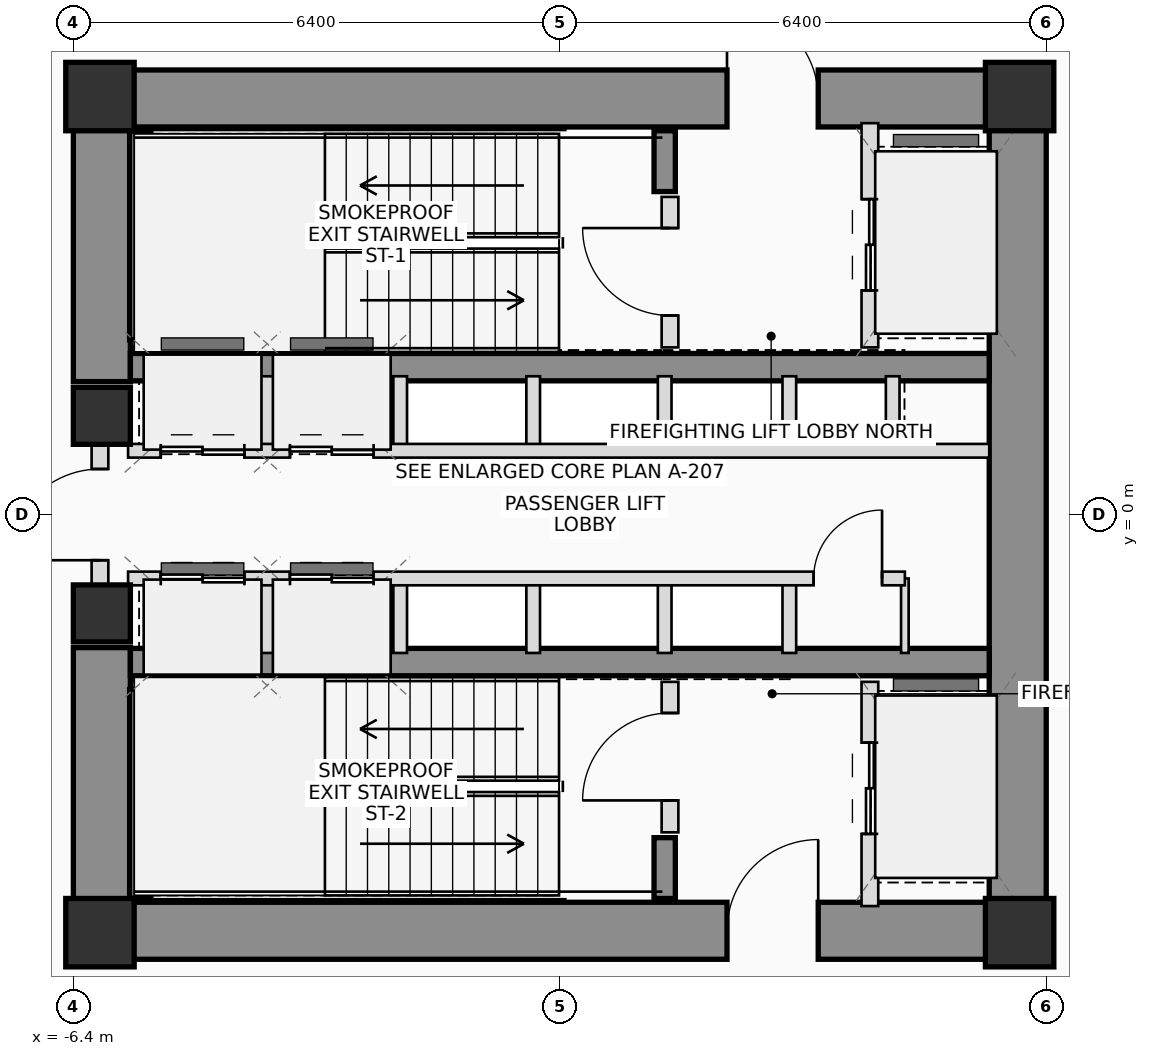
"""IFC4 building model, lengths in metres.
Left out: names, types, materials, properties, quantities, classifications, styles, units other than length and angle.
Written with IfcOpenShell. Run it as: python <this file> out.ifc"""

import sys

from ifc_helpers import new_model, si_unit, direction, frame, frame_2d, origin, origin_2d, place, context, subcontext, project, spatial, rectangle, extrude, source, transform, mapped, element, fill, save


model = new_model("IFC4")
c1 = context("Model", 3, precision=1e-05, world=origin(), true_north=direction((0.0, 1.0)))
c2 = subcontext(c1, "Body", "Model", "MODEL_VIEW")
j1 = project(units=[si_unit("LENGTHUNIT", "METRE"), si_unit("PLANEANGLEUNIT", "RADIAN")], contexts=[c1])
p1 = place(None, origin())
s1 = spatial("IfcSite", under=j1, at=p1, CompositionType="ELEMENT")
p2 = place(p1, origin())
s2 = spatial("IfcBuilding", under=s1, at=p2, CompositionType="ELEMENT")
p3 = place(p2, frame((0.0, 0.0, 69.8)))
s3 = spatial("IfcBuildingStorey", under=s2, at=p3, CompositionType="ELEMENT", Elevation=69.8)
m1 = source(origin(), c2, "Body", "SweptSolid", [
    extrude(rectangle(XDim=0.9, YDim=0.9, at=origin_2d()), origin(), (0.0, 0.0, 1.0), 3.75),
])
for number, where, z_axis, x_axis in (
    (1, (-6.05, -5.5, 0.0), (0.0, 0.0, 1.0), (1.0, 0.0, 0.0)),
    (2, (6.05, -5.5, 0.0), (0.0, 0.0, 1.0), (1.0, 0.0, 0.0)),
    (3, (6.05, 5.5, 0.0), (0.0, 0.0, 1.0), (1.0, 0.0, 0.0)),
    (4, (-6.05, 5.5, 0.0), (0.0, 0.0, 1.0), (1.0, 0.0, 0.0)),
):
    element("IfcColumn", number, at=place(p3, frame(where, z_axis=z_axis, x_axis=x_axis)), inside=s3, PredefinedType="COLUMN", context=c2, shape_type="MappedRepresentation", body=[
        mapped(m1, transform((0.0, 0.0, 0.0), scale=1.0)),
    ])
p4 = place(p3, frame((-6.4, 5.475, 0.0), z_axis=(0.0, 0.0, 1.0), x_axis=(1.0, 0.0, 0.0)))
e5 = element("IfcWall", 5, at=p4, inside=s3, PredefinedType="SHEAR", context=c2, shape_type="SweptSolid", body=[
    extrude(rectangle(XDim=12.8, YDim=0.75, at=frame_2d((6.4, 0.0))), origin(), (0.0, 0.0, 1.0), 3.75),
])
p5 = place(p4, frame((8.6, 0.0, 0.0)))
e6 = element("IfcOpeningElement", 6, at=p5, cuts=e5, PredefinedType="OPENING", context=c2, shape_type="SweptSolid", body=[
    extrude(rectangle(XDim=1.2, YDim=2.2, at=frame_2d((0.6, 1.1))), frame((0.0, 0.385, 0.0), z_axis=(0.0, -1.0, 0.0), x_axis=(1.0, 0.0, 0.0)), (0.0, 0.0, 1.0), 0.77),
])
p6 = place(p3, frame((-6.4, -5.475, 0.0), z_axis=(0.0, 0.0, 1.0), x_axis=(1.0, 0.0, 0.0)))
e7 = element("IfcWall", 7, at=p6, inside=s3, PredefinedType="SHEAR", context=c2, shape_type="SweptSolid", body=[
    extrude(rectangle(XDim=12.8, YDim=0.75, at=frame_2d((6.4, 0.0))), origin(), (0.0, 0.0, 1.0), 3.75),
])
p7 = place(p6, frame((8.6, 0.0, 0.0)))
e8 = element("IfcOpeningElement", 8, at=p7, cuts=e7, PredefinedType="OPENING", context=c2, shape_type="SweptSolid", body=[
    extrude(rectangle(XDim=1.2, YDim=2.2, at=frame_2d((0.6, 1.1))), frame((0.0, 0.385, 0.0), z_axis=(0.0, -1.0, 0.0), x_axis=(1.0, 0.0, 0.0)), (0.0, 0.0, 1.0), 0.77),
])
p8 = place(p3, frame((6.025, -5.1, 0.0), z_axis=(0.0, 0.0, 1.0), x_axis=(0.0, 1.0, 0.0)))
e9 = element("IfcWall", 9, at=p8, inside=s3, PredefinedType="SHEAR", context=c2, shape_type="SweptSolid", body=[
    extrude(rectangle(XDim=10.2, YDim=0.75, at=frame_2d((5.1, 0.0))), origin(), (0.0, 0.0, 1.0), 3.75),
])
for number, where, z_axis, x_axis in (
    (10, (-6.025, -5.1, 0.0), (0.0, 0.0, 1.0), (0.0, 1.0, 0.0)),
    (11, (-6.025, 1.75, 0.0), (0.0, 0.0, 1.0), (0.0, 1.0, 0.0)),
):
    element("IfcWall", number, at=place(p3, frame(where, z_axis=z_axis, x_axis=x_axis)), inside=s3, PredefinedType="SHEAR", context=c2, shape_type="SweptSolid", body=[
        extrude(rectangle(XDim=3.35, YDim=0.75, at=frame_2d((1.675, 0.0))), origin(), (0.0, 0.0, 1.0), 3.75),
    ])
for number, where, z_axis, x_axis in (
    (12, (-5.65, 1.94, 0.0), (0.0, 0.0, 1.0), (1.0, 0.0, 0.0)),
    (13, (-5.65, -1.94, 0.0), (0.0, 0.0, 1.0), (1.0, 0.0, 0.0)),
):
    element("IfcWall", number, at=place(p3, frame(where, z_axis=z_axis, x_axis=x_axis)), inside=s3, PredefinedType="SHEAR", context=c2, shape_type="SweptSolid", body=[
        extrude(rectangle(XDim=11.3, YDim=0.36, at=frame_2d((5.65, 0.0))), origin(), (0.0, 0.0, 1.0), 3.75),
    ])
p9 = place(p3, frame((-5.52, 2.3, 0.0), z_axis=(0.0, 0.0, 1.0), x_axis=(0.0, 1.0, 0.0)))
e14 = element("IfcWall", 14, at=p9, inside=s3, PredefinedType="SHEAR", context=c2, shape_type="SweptSolid", body=[
    extrude(rectangle(XDim=2.75, YDim=0.28, at=frame_2d((1.375, 0.0))), origin(), (0.0, 0.0, 1.0), 3.75),
])
p10 = place(p3, frame((1.38, 4.25, 0.0), z_axis=(0.0, 0.0, 1.0), x_axis=(0.0, 1.0, 0.0)))
e15 = element("IfcWall", 15, at=p10, inside=s3, PredefinedType="SHEAR", context=c2, shape_type="SweptSolid", body=[
    extrude(rectangle(XDim=0.8, YDim=0.28, at=frame_2d((0.4, 0.0))), origin(), (0.0, 0.0, 1.0), 3.75),
])
p11 = place(p3, frame((-5.52, -5.05, 0.0), z_axis=(0.0, 0.0, 1.0), x_axis=(0.0, 1.0, 0.0)))
e16 = element("IfcWall", 16, at=p11, inside=s3, PredefinedType="SHEAR", context=c2, shape_type="SweptSolid", body=[
    extrude(rectangle(XDim=2.75, YDim=0.28, at=frame_2d((1.375, 0.0))), origin(), (0.0, 0.0, 1.0), 3.75),
])
p12 = place(p3, frame((1.38, -5.05, 0.0), z_axis=(0.0, 0.0, 1.0), x_axis=(0.0, 1.0, 0.0)))
e17 = element("IfcWall", 17, at=p12, inside=s3, PredefinedType="SHEAR", context=c2, shape_type="SweptSolid", body=[
    extrude(rectangle(XDim=0.8, YDim=0.28, at=frame_2d((0.4, 0.0))), origin(), (0.0, 0.0, 1.0), 3.75),
])
m2 = source(origin(), c2, "Body", "SweptSolid", [
    extrude(rectangle(XDim=0.75, YDim=0.75, at=origin_2d()), origin(), (0.0, 0.0, 1.0), 3.75),
])
for number, where, z_axis, x_axis in (
    (18, (-6.025, -1.3, 0.0), (0.0, 0.0, 1.0), (1.0, 0.0, 0.0)),
    (19, (-6.025, 1.3, 0.0), (0.0, 0.0, 1.0), (1.0, 0.0, 0.0)),
):
    element("IfcColumn", number, at=place(p3, frame(where, z_axis=z_axis, x_axis=x_axis)), inside=s3, PredefinedType="COLUMN", context=c2, shape_type="MappedRepresentation", body=[
        mapped(m2, transform((0.0, 0.0, 0.0), scale=1.0)),
    ])
p13 = place(p3, frame((-6.05, -0.95, 0.0), z_axis=(0.0, 0.0, 1.0), x_axis=(0.0, 1.0, 0.0)))
e20 = element("IfcWall", 20, at=p13, inside=s3, PredefinedType="PLUMBINGWALL", context=c2, shape_type="SweptSolid", body=[
    extrude(rectangle(XDim=1.9, YDim=0.22, at=frame_2d((0.95, 0.0))), origin(), (0.0, 0.0, 1.0), 2.525),
])
p14 = place(p13, frame((0.35, 0.0, 0.0)))
e21 = element("IfcOpeningElement", 21, at=p14, cuts=e20, PredefinedType="OPENING", context=c2, shape_type="SweptSolid", body=[
    extrude(rectangle(XDim=1.2, YDim=2.2, at=frame_2d((0.6, 1.1))), frame((0.0, 0.12, 0.0), z_axis=(0.0, -1.0, 0.0), x_axis=(1.0, 0.0, 0.0)), (0.0, 0.0, 1.0), 0.24),
])
p15 = place(p3, frame((1.45, 2.2, 0.0), z_axis=(0.0, 0.0, 1.0), x_axis=(0.0, 1.0, 0.0)))
e22 = element("IfcWall", 22, at=p15, inside=s3, PredefinedType="PLUMBINGWALL", context=c2, shape_type="SweptSolid", body=[
    extrude(rectangle(XDim=1.98, YDim=0.22, at=frame_2d((0.99, 0.0))), origin(), (0.0, 0.0, 1.0), 3.545),
])
p16 = place(p15, frame((0.42, 0.0, 0.0)))
e23 = element("IfcOpeningElement", 23, at=p16, cuts=e22, PredefinedType="OPENING", context=c2, shape_type="SweptSolid", body=[
    extrude(rectangle(XDim=1.15, YDim=2.15, at=frame_2d((0.575, 1.075))), frame((0.0, 0.12, 0.0), z_axis=(0.0, -1.0, 0.0), x_axis=(1.0, 0.0, 0.0)), (0.0, 0.0, 1.0), 0.24),
])
p17 = place(p3, frame((4.08, 2.2, 0.0), z_axis=(0.0, 0.0, 1.0), x_axis=(0.0, 1.0, 0.0)))
e24 = element("IfcWall", 24, at=p17, inside=s3, PredefinedType="PLUMBINGWALL", context=c2, shape_type="SweptSolid", body=[
    extrude(rectangle(XDim=2.95, YDim=0.22, at=frame_2d((1.475, 0.0))), origin(), (0.0, 0.0, 1.0), 3.545),
])
p18 = place(p17, frame((0.75, 0.0, 0.0)))
e25 = element("IfcOpeningElement", 25, at=p18, cuts=e24, PredefinedType="OPENING", context=c2, shape_type="SweptSolid", body=[
    extrude(rectangle(XDim=1.2, YDim=2.25, at=frame_2d((0.6, 1.125))), frame((0.0, 0.12, 0.0), z_axis=(0.0, -1.0, 0.0), x_axis=(1.0, 0.0, 0.0)), (0.0, 0.0, 1.0), 0.24),
])
p19 = place(p3, frame((1.45, -4.18, 0.0), z_axis=(0.0, 0.0, 1.0), x_axis=(0.0, 1.0, 0.0)))
e26 = element("IfcWall", 26, at=p19, inside=s3, PredefinedType="PLUMBINGWALL", context=c2, shape_type="SweptSolid", body=[
    extrude(rectangle(XDim=1.98, YDim=0.22, at=frame_2d((0.99, 0.0))), origin(), (0.0, 0.0, 1.0), 3.545),
])
p20 = place(p19, frame((0.42, 0.0, 0.0)))
e27 = element("IfcOpeningElement", 27, at=p20, cuts=e26, PredefinedType="OPENING", context=c2, shape_type="SweptSolid", body=[
    extrude(rectangle(XDim=1.15, YDim=2.15, at=frame_2d((0.575, 1.075))), frame((0.0, 0.12, 0.0), z_axis=(0.0, -1.0, 0.0), x_axis=(1.0, 0.0, 0.0)), (0.0, 0.0, 1.0), 0.24),
])
p21 = place(p3, frame((4.08, -5.15, 0.0), z_axis=(0.0, 0.0, 1.0), x_axis=(0.0, 1.0, 0.0)))
e28 = element("IfcWall", 28, at=p21, inside=s3, PredefinedType="PLUMBINGWALL", context=c2, shape_type="SweptSolid", body=[
    extrude(rectangle(XDim=2.95, YDim=0.22, at=frame_2d((1.475, 0.0))), origin(), (0.0, 0.0, 1.0), 3.545),
])
p22 = place(p21, frame((0.95, 0.0, 0.0)))
e29 = element("IfcOpeningElement", 29, at=p22, cuts=e28, PredefinedType="OPENING", context=c2, shape_type="SweptSolid", body=[
    extrude(rectangle(XDim=1.2, YDim=2.25, at=frame_2d((0.6, 1.125))), frame((0.0, 0.12, 0.0), z_axis=(0.0, -1.0, 0.0), x_axis=(1.0, 0.0, 0.0)), (0.0, 0.0, 1.0), 0.24),
])
for number, where, z_axis, x_axis in (
    (30, (-3.85, 0.84, 0.0), (0.0, 0.0, 1.0), (0.0, 1.0, 0.0)),
    (31, (-3.85, -1.82, 0.0), (0.0, 0.0, 1.0), (0.0, 1.0, 0.0)),
    (32, (-2.1, 0.84, 0.0), (0.0, 0.0, 1.0), (0.0, 1.0, 0.0)),
    (33, (-2.1, -1.82, 0.0), (0.0, 0.0, 1.0), (0.0, 1.0, 0.0)),
    (34, (-0.35, 0.84, 0.0), (0.0, 0.0, 1.0), (0.0, 1.0, 0.0)),
    (35, (-0.35, -1.82, 0.0), (0.0, 0.0, 1.0), (0.0, 1.0, 0.0)),
    (36, (1.38, 0.84, 0.0), (0.0, 0.0, 1.0), (0.0, 1.0, 0.0)),
    (37, (1.38, -1.82, 0.0), (0.0, 0.0, 1.0), (0.0, 1.0, 0.0)),
    (38, (3.02, 0.84, 0.0), (0.0, 0.0, 1.0), (0.0, 1.0, 0.0)),
    (39, (4.38, 0.84, 0.0), (0.0, 0.0, 1.0), (0.0, 1.0, 0.0)),
    (40, (3.02, -1.82, 0.0), (0.0, 0.0, 1.0), (0.0, 1.0, 0.0)),
):
    element("IfcWall", number, at=place(p3, frame(where, z_axis=z_axis, x_axis=x_axis)), inside=s3, PredefinedType="PLUMBINGWALL", context=c2, shape_type="SweptSolid", body=[
        extrude(rectangle(XDim=0.98, YDim=0.18, at=frame_2d((0.49, 0.0))), origin(), (0.0, 0.0, 1.0), 3.545),
    ])
p23 = place(p3, frame((4.54, -1.82, 0.0), z_axis=(0.0, 0.0, 1.0), x_axis=(0.0, 1.0, 0.0)))
e41 = element("IfcWall", 41, at=p23, inside=s3, PredefinedType="PARTITIONING", context=c2, shape_type="SweptSolid", body=[
    extrude(rectangle(XDim=0.98, YDim=0.1, at=frame_2d((0.49, 0.0))), origin(), (0.0, 0.0, 1.0), 3.545),
])
p24 = place(p3, frame((-5.68, 0.84, 0.0), z_axis=(0.0, 0.0, 1.0), x_axis=(1.0, 0.0, 0.0)))
e42 = element("IfcWall", 42, at=p24, inside=s3, PredefinedType="PLUMBINGWALL", context=c2, shape_type="SweptSolid", body=[
    extrude(rectangle(XDim=11.33, YDim=0.18, at=frame_2d((5.665, 0.0))), origin(), (0.0, 0.0, 1.0), 3.545),
])
p25 = place(p24, frame((0.43, 0.0, 0.0)))
e43 = element("IfcOpeningElement", 43, at=p25, cuts=e42, PredefinedType="OPENING", context=c2, shape_type="SweptSolid", body=[
    extrude(rectangle(XDim=1.1, YDim=2.2, at=frame_2d((0.55, 1.1))), frame((0.0, 0.1, 0.0), z_axis=(0.0, -1.0, 0.0), x_axis=(1.0, 0.0, 0.0)), (0.0, 0.0, 1.0), 0.2),
])
p26 = place(p24, frame((2.13, 0.0, 0.0)))
e44 = element("IfcOpeningElement", 44, at=p26, cuts=e42, PredefinedType="OPENING", context=c2, shape_type="SweptSolid", body=[
    extrude(rectangle(XDim=1.1, YDim=2.2, at=frame_2d((0.55, 1.1))), frame((0.0, 0.1, 0.0), z_axis=(0.0, -1.0, 0.0), x_axis=(1.0, 0.0, 0.0)), (0.0, 0.0, 1.0), 0.2),
])
p27 = place(p3, frame((-5.68, -0.84, 0.0), z_axis=(0.0, 0.0, 1.0), x_axis=(1.0, 0.0, 0.0)))
e45 = element("IfcWall", 45, at=p27, inside=s3, PredefinedType="PLUMBINGWALL", context=c2, shape_type="SweptSolid", body=[
    extrude(rectangle(XDim=10.22, YDim=0.18, at=frame_2d((5.11, 0.0))), origin(), (0.0, 0.0, 1.0), 3.545),
])
p28 = place(p27, frame((0.43, 0.0, 0.0)))
e46 = element("IfcOpeningElement", 46, at=p28, cuts=e45, PredefinedType="OPENING", context=c2, shape_type="SweptSolid", body=[
    extrude(rectangle(XDim=1.1, YDim=2.2, at=frame_2d((0.55, 1.1))), frame((0.0, 0.1, 0.0), z_axis=(0.0, -1.0, 0.0), x_axis=(1.0, 0.0, 0.0)), (0.0, 0.0, 1.0), 0.2),
])
p29 = place(p27, frame((2.13, 0.0, 0.0)))
e47 = element("IfcOpeningElement", 47, at=p29, cuts=e45, PredefinedType="OPENING", context=c2, shape_type="SweptSolid", body=[
    extrude(rectangle(XDim=1.1, YDim=2.2, at=frame_2d((0.55, 1.1))), frame((0.0, 0.1, 0.0), z_axis=(0.0, -1.0, 0.0), x_axis=(1.0, 0.0, 0.0)), (0.0, 0.0, 1.0), 0.2),
])
p30 = place(p27, frame((9.02, 0.0, 0.0)))
e48 = element("IfcOpeningElement", 48, at=p30, cuts=e45, PredefinedType="OPENING", context=c2, shape_type="SweptSolid", body=[
    extrude(rectangle(XDim=0.9, YDim=2.05, at=frame_2d((0.45, 1.025))), frame((0.0, 0.1, 0.0), z_axis=(0.0, -1.0, 0.0), x_axis=(1.0, 0.0, 0.0)), (0.0, 0.0, 1.0), 0.2),
])
p31 = place(p5, origin())
e49 = element("IfcDoor", 49, at=p31, inside=s3, OperationType="SINGLE_SWING_LEFT", PredefinedType="DOOR", context=c2, shape_type="SweptSolid", body=[
    extrude(rectangle(XDim=1.2, YDim=2.2, at=frame_2d((0.6, 1.1))), frame((0.0, 0.025, 0.0), z_axis=(0.0, -1.0, 0.0), x_axis=(1.0, 0.0, 0.0)), (0.0, 0.0, 1.0), 0.05),
])
fill(e6, e49)
p32 = place(p7, origin())
e50 = element("IfcDoor", 50, at=p32, inside=s3, OperationType="SINGLE_SWING_RIGHT", PredefinedType="DOOR", context=c2, shape_type="SweptSolid", body=[
    extrude(rectangle(XDim=1.2, YDim=2.2, at=frame_2d((0.6, 1.1))), frame((0.0, 0.025, 0.0), z_axis=(0.0, -1.0, 0.0), x_axis=(1.0, 0.0, 0.0)), (0.0, 0.0, 1.0), 0.05),
])
fill(e8, e50)
p33 = place(p14, origin())
e51 = element("IfcDoor", 51, at=p33, inside=s3, OperationType="SINGLE_SWING_LEFT", PredefinedType="DOOR", context=c2, shape_type="SweptSolid", body=[
    extrude(rectangle(XDim=1.2, YDim=2.2, at=frame_2d((0.6, 1.1))), frame((0.0, 0.025, 0.0), z_axis=(0.0, -1.0, 0.0), x_axis=(1.0, 0.0, 0.0)), (0.0, 0.0, 1.0), 0.05),
])
fill(e21, e51)
p34 = place(p16, origin())
e52 = element("IfcDoor", 52, at=p34, inside=s3, OperationType="SINGLE_SWING_RIGHT", PredefinedType="DOOR", context=c2, shape_type="SweptSolid", body=[
    extrude(rectangle(XDim=1.15, YDim=2.15, at=frame_2d((0.575, 1.075))), frame((0.0, 0.025, 0.0), z_axis=(0.0, -1.0, 0.0), x_axis=(1.0, 0.0, 0.0)), (0.0, 0.0, 1.0), 0.05),
])
fill(e23, e52)
p35 = place(p18, origin())
e53 = element("IfcDoor", 53, at=p35, inside=s3, OperationType="DOUBLE_DOOR_SLIDING", PredefinedType="DOOR", context=c2, shape_type="SweptSolid", body=[
    extrude(rectangle(XDim=1.2, YDim=2.25, at=frame_2d((0.6, 1.125))), frame((0.0, 0.025, 0.0), z_axis=(0.0, -1.0, 0.0), x_axis=(1.0, 0.0, 0.0)), (0.0, 0.0, 1.0), 0.05),
])
fill(e25, e53)
p36 = place(p20, origin())
e54 = element("IfcDoor", 54, at=p36, inside=s3, OperationType="SINGLE_SWING_LEFT", PredefinedType="DOOR", context=c2, shape_type="SweptSolid", body=[
    extrude(rectangle(XDim=1.15, YDim=2.15, at=frame_2d((0.575, 1.075))), frame((0.0, 0.025, 0.0), z_axis=(0.0, -1.0, 0.0), x_axis=(1.0, 0.0, 0.0)), (0.0, 0.0, 1.0), 0.05),
])
fill(e27, e54)
p37 = place(p22, origin())
e55 = element("IfcDoor", 55, at=p37, inside=s3, OperationType="DOUBLE_DOOR_SLIDING", PredefinedType="DOOR", context=c2, shape_type="SweptSolid", body=[
    extrude(rectangle(XDim=1.2, YDim=2.25, at=frame_2d((0.6, 1.125))), frame((0.0, 0.025, 0.0), z_axis=(0.0, -1.0, 0.0), x_axis=(1.0, 0.0, 0.0)), (0.0, 0.0, 1.0), 0.05),
])
fill(e29, e55)
p38 = place(p25, origin())
e56 = element("IfcDoor", 56, at=p38, inside=s3, OperationType="DOUBLE_DOOR_SLIDING", PredefinedType="DOOR", context=c2, shape_type="SweptSolid", body=[
    extrude(rectangle(XDim=1.1, YDim=2.2, at=frame_2d((0.55, 1.1))), frame((0.0, 0.025, 0.0), z_axis=(0.0, -1.0, 0.0), x_axis=(1.0, 0.0, 0.0)), (0.0, 0.0, 1.0), 0.05),
])
fill(e43, e56)
p39 = place(p26, origin())
e57 = element("IfcDoor", 57, at=p39, inside=s3, OperationType="DOUBLE_DOOR_SLIDING", PredefinedType="DOOR", context=c2, shape_type="SweptSolid", body=[
    extrude(rectangle(XDim=1.1, YDim=2.2, at=frame_2d((0.55, 1.1))), frame((0.0, 0.025, 0.0), z_axis=(0.0, -1.0, 0.0), x_axis=(1.0, 0.0, 0.0)), (0.0, 0.0, 1.0), 0.05),
])
fill(e44, e57)
p40 = place(p28, origin())
e58 = element("IfcDoor", 58, at=p40, inside=s3, OperationType="DOUBLE_DOOR_SLIDING", PredefinedType="DOOR", context=c2, shape_type="SweptSolid", body=[
    extrude(rectangle(XDim=1.1, YDim=2.2, at=frame_2d((0.55, 1.1))), frame((0.0, 0.025, 0.0), z_axis=(0.0, -1.0, 0.0), x_axis=(1.0, 0.0, 0.0)), (0.0, 0.0, 1.0), 0.05),
])
fill(e46, e58)
p41 = place(p29, origin())
e59 = element("IfcDoor", 59, at=p41, inside=s3, OperationType="DOUBLE_DOOR_SLIDING", PredefinedType="DOOR", context=c2, shape_type="SweptSolid", body=[
    extrude(rectangle(XDim=1.1, YDim=2.2, at=frame_2d((0.55, 1.1))), frame((0.0, 0.025, 0.0), z_axis=(0.0, -1.0, 0.0), x_axis=(1.0, 0.0, 0.0)), (0.0, 0.0, 1.0), 0.05),
])
fill(e47, e59)
p42 = place(p30, origin())
e60 = element("IfcDoor", 60, at=p42, inside=s3, OperationType="SINGLE_SWING_RIGHT", PredefinedType="DOOR", context=c2, shape_type="SweptSolid", body=[
    extrude(rectangle(XDim=0.9, YDim=2.05, at=frame_2d((0.45, 1.025))), frame((0.0, 0.025, 0.0), z_axis=(0.0, -1.0, 0.0), x_axis=(1.0, 0.0, 0.0)), (0.0, 0.0, 1.0), 0.05),
])
fill(e48, e60)
save(model, sys.argv[1])
